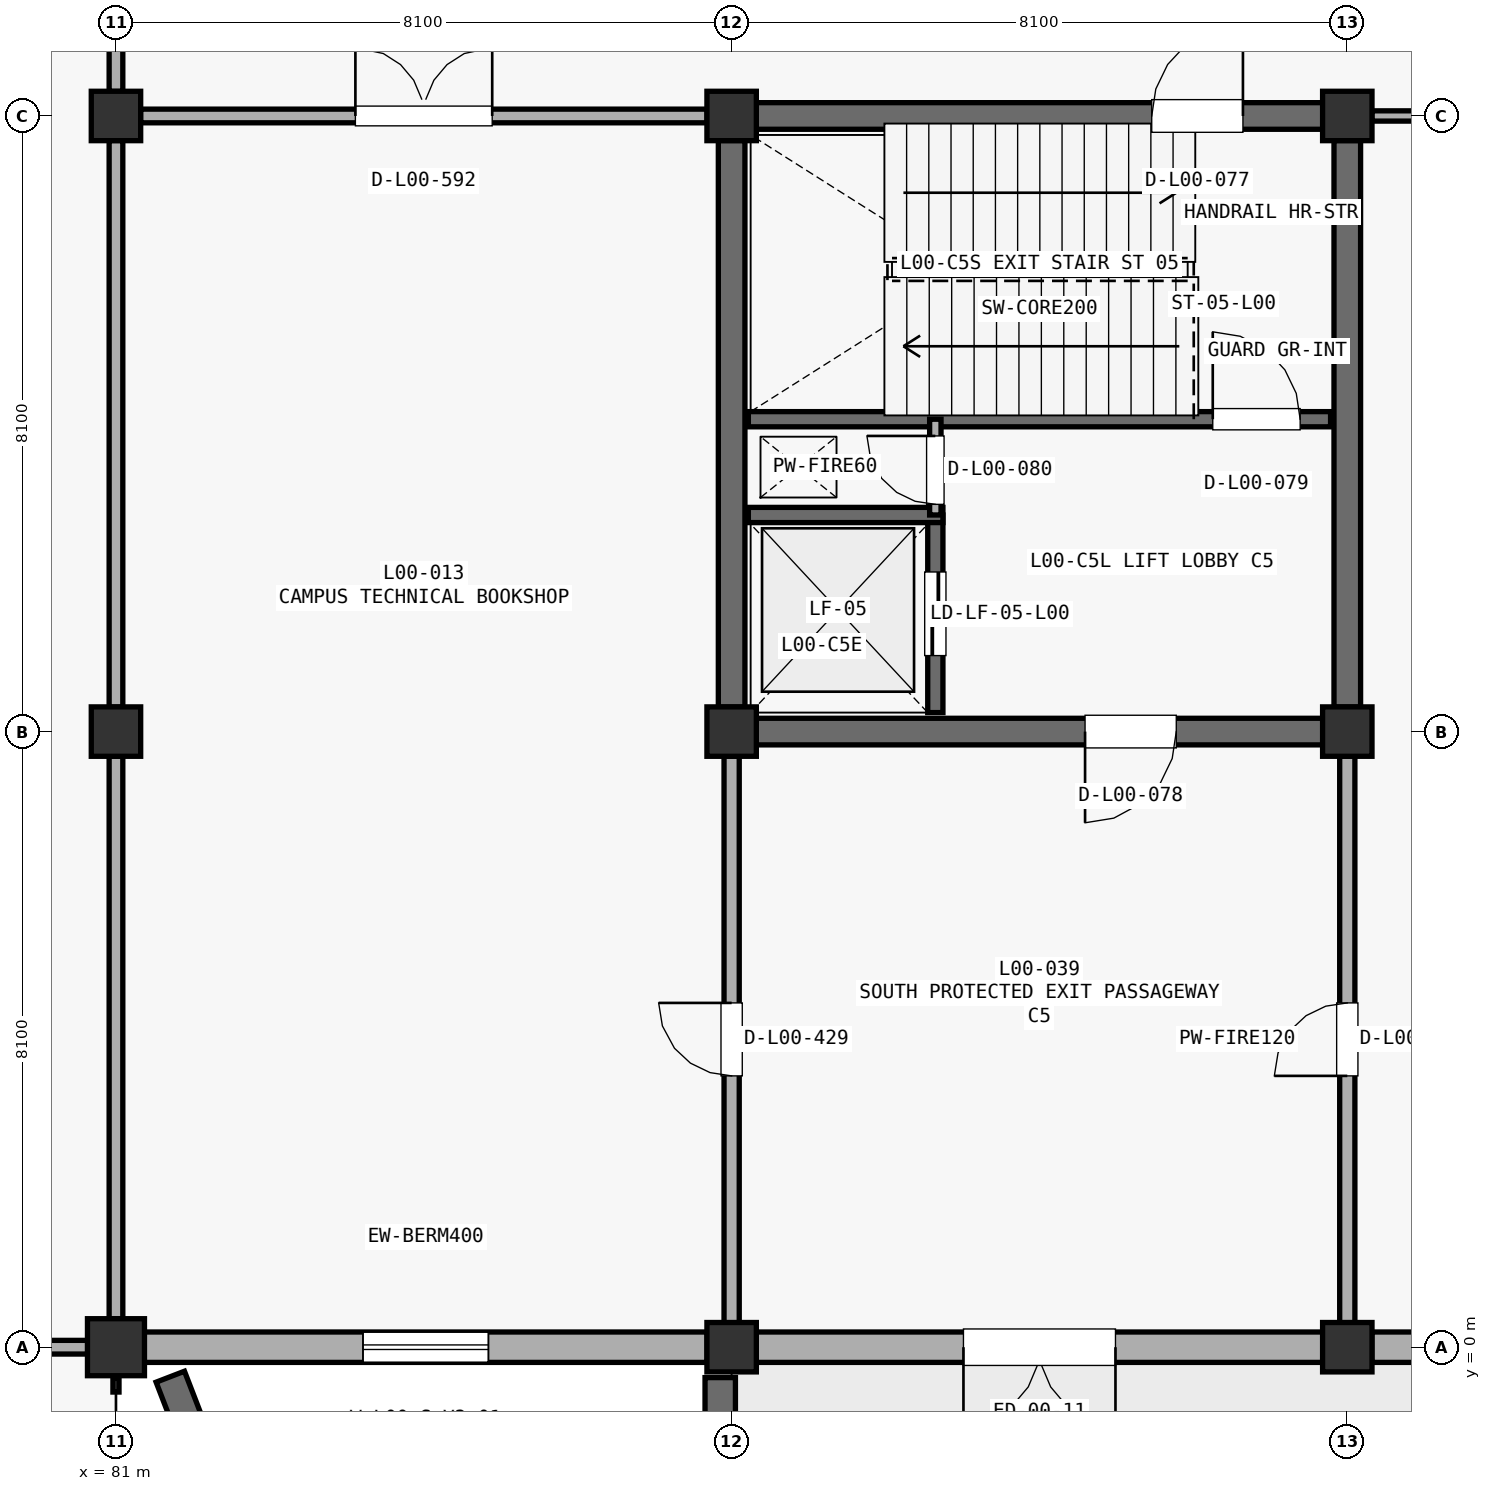
"""IFC4 building model, lengths in metres.
Left out: names, types, materials, properties, quantities, classifications, styles, units other than length and angle.
Written with IfcOpenShell. Run it as: python <this file> out.ifc"""

import sys

from ifc_helpers import new_model, si_unit, direction, frame, frame_2d, origin, origin_2d, place, context, subcontext, project, spatial, rectangle, circle, extrude, element, fill, save


model = new_model("IFC4")
c1 = context("Model", 3, precision=1e-05, world=origin(), true_north=direction((0.0, 1.0)))
c2 = subcontext(c1, "Body", "Model", "MODEL_VIEW")
j1 = project(units=[si_unit("LENGTHUNIT", "METRE"), si_unit("PLANEANGLEUNIT", "RADIAN")], contexts=[c1])
p1 = place(None, origin())
s1 = spatial("IfcSite", under=j1, at=p1, CompositionType="ELEMENT")
p2 = place(p1, origin())
s2 = spatial("IfcBuilding", under=s1, at=p2, CompositionType="ELEMENT")
p3 = place(p2, origin())
s3 = spatial("IfcBuildingStorey", under=s2, at=p3, CompositionType="ELEMENT", Elevation=0.0)
p4 = place(p3, frame((81.0, 0.0, 0.0), z_axis=(0.0, 0.0, 1.0), x_axis=(1.0, 0.0, 0.0)))
e1 = element("IfcColumn", 1, at=p4, inside=s3, PredefinedType="COLUMN", context=c2, shape_type="SweptSolid", body=[
    extrude(circle(Radius=0.375, at=origin_2d()), origin(), (0.0, 0.0, 1.0), 5.1),
])
for number, where, z_axis, x_axis in (
    (2, (81.0, 8.1, 0.0), (0.0, 0.0, 1.0), (1.0, 0.0, 0.0)),
    (3, (81.0, 16.2, 0.0), (0.0, 0.0, 1.0), (1.0, 0.0, 0.0)),
    (4, (89.1, 0.0, 0.0), (0.0, 0.0, 1.0), (1.0, 0.0, 0.0)),
    (5, (89.1, 8.1, 0.0), (0.0, 0.0, 1.0), (1.0, 0.0, 0.0)),
    (6, (89.1, 16.2, 0.0), (0.0, 0.0, 1.0), (1.0, 0.0, 0.0)),
    (7, (97.2, 0.0, 0.0), (0.0, 0.0, 1.0), (1.0, 0.0, 0.0)),
    (8, (97.2, 8.1, 0.0), (0.0, 0.0, 1.0), (1.0, 0.0, 0.0)),
    (9, (97.2, 16.2, 0.0), (0.0, 0.0, 1.0), (1.0, 0.0, 0.0)),
):
    element("IfcColumn", number, at=place(p3, frame(where, z_axis=z_axis, x_axis=x_axis)), inside=s3, PredefinedType="COLUMN", context=c2, shape_type="SweptSolid", body=[
        extrude(rectangle(XDim=0.65, YDim=0.65, at=origin_2d()), origin(), (0.0, 0.0, 1.0), 5.1),
    ])
p5 = place(p3, frame((88.95, -3.67, 0.0), z_axis=(0.0, 0.0, 1.0), x_axis=(0.0, 1.0, 0.0)))
e10 = element("IfcWall", 10, at=p5, inside=s3, PredefinedType="SOLIDWALL", context=c2, shape_type="SweptSolid", body=[
    extrude(rectangle(XDim=3.27, YDim=0.4, at=frame_2d((1.635, 0.0))), origin(), (0.0, 0.0, 1.0), 4.822),
])
p6 = place(p3, frame((81.715, -0.388, 0.0), z_axis=(0.0, 0.0, 1.0), x_axis=(0.359785215101, -0.933035154212, 0.0)))
e11 = element("IfcWall", 11, at=p6, inside=s3, PredefinedType="SOLIDWALL", context=c2, shape_type="SweptSolid", body=[
    extrude(rectangle(XDim=3.531, YDim=0.4, at=frame_2d((1.765, 0.0))), origin(), (0.0, 0.0, 1.0), 4.822),
])
p7 = place(p3, frame((81.373, 0.0, 0.0), z_axis=(0.0, 0.0, 1.0), x_axis=(1.0, 0.0, 0.0)))
e12 = element("IfcWall", 12, at=p7, inside=s3, PredefinedType="STANDARD", context=c2, shape_type="SweptSolid", body=[
    extrude(rectangle(XDim=7.404, YDim=0.4, at=frame_2d((3.702, 0.0))), origin(), (0.0, 0.0, 1.0), 4.289),
])
p8 = place(p7, frame((2.877, 0.0, 0.85)))
e13 = element("IfcOpeningElement", 13, at=p8, cuts=e12, PredefinedType="OPENING", context=c2, shape_type="SweptSolid", body=[
    extrude(rectangle(XDim=1.65, YDim=1.75, at=frame_2d((0.825, 0.875))), frame((0.0, 0.21, 0.0), z_axis=(0.0, -1.0, 0.0), x_axis=(1.0, 0.0, 0.0)), (0.0, 0.0, 1.0), 0.42),
])
p9 = place(p3, frame((89.423, 0.0, 0.0), z_axis=(0.0, 0.0, 1.0), x_axis=(1.0, 0.0, 0.0)))
e14 = element("IfcWall", 14, at=p9, inside=s3, PredefinedType="STANDARD", context=c2, shape_type="SweptSolid", body=[
    extrude(rectangle(XDim=7.454, YDim=0.4, at=frame_2d((3.727, 0.0))), origin(), (0.0, 0.0, 1.0), 4.359),
])
p10 = place(p9, frame((4.727, 0.0, 0.0), z_axis=(0.0, 0.0, 1.0), x_axis=(-1.0, 0.0, 0.0)))
e15 = element("IfcOpeningElement", 15, at=p10, cuts=e14, PredefinedType="OPENING", context=c2, shape_type="SweptSolid", body=[
    extrude(rectangle(XDim=2.0, YDim=2.2, at=frame_2d((1.0, 1.1))), frame((0.0, 0.21, 0.0), z_axis=(0.0, -1.0, 0.0), x_axis=(1.0, 0.0, 0.0)), (0.0, 0.0, 1.0), 0.42),
])
p11 = place(p3, frame((97.523, 0.0, 0.0), z_axis=(0.0, 0.0, 1.0), x_axis=(1.0, 0.0, 0.0)))
e16 = element("IfcWall", 16, at=p11, inside=s3, PredefinedType="STANDARD", context=c2, shape_type="SweptSolid", body=[
    extrude(rectangle(XDim=7.454, YDim=0.4, at=frame_2d((3.727, 0.0))), origin(), (0.0, 0.0, 1.0), 4.172),
])
p12 = place(p11, frame((4.927, 0.0, 0.0), z_axis=(0.0, 0.0, 1.0), x_axis=(-1.0, 0.0, 0.0)))
e17 = element("IfcOpeningElement", 17, at=p12, cuts=e16, PredefinedType="OPENING", context=c2, shape_type="SweptSolid", body=[
    extrude(rectangle(XDim=2.4, YDim=2.4, at=frame_2d((1.2, 1.2))), frame((0.0, 0.21, 0.0), z_axis=(0.0, -1.0, 0.0), x_axis=(1.0, 0.0, 0.0)), (0.0, 0.0, 1.0), 0.42),
])
p13 = place(p3, frame((89.423, 16.2, 0.0), z_axis=(0.0, 0.0, 1.0), x_axis=(1.0, 0.0, 0.0)))
e18 = element("IfcWall", 18, at=p13, inside=s3, PredefinedType="SHEAR", context=c2, shape_type="SweptSolid", body=[
    extrude(rectangle(XDim=7.454, YDim=0.35, at=frame_2d((3.727, 0.0))), origin(), (0.0, 0.0, 1.0), 4.822),
])
p14 = place(p13, frame((5.204, 0.0, 0.0)))
e19 = element("IfcOpeningElement", 19, at=p14, cuts=e18, PredefinedType="OPENING", context=c2, shape_type="SweptSolid", body=[
    extrude(rectangle(XDim=1.2, YDim=2.2, at=frame_2d((0.6, 1.1))), frame((0.0, 0.185, 0.0), z_axis=(0.0, -1.0, 0.0), x_axis=(1.0, 0.0, 0.0)), (0.0, 0.0, 1.0), 0.37),
])
for number, where, z_axis, x_axis in (
    (20, (89.1, 8.423, 0.0), (0.0, 0.0, 1.0), (0.0, 1.0, 0.0)),
    (21, (97.2, 8.423, 0.0), (0.0, 0.0, 1.0), (0.0, 1.0, 0.0)),
):
    element("IfcWall", number, at=place(p3, frame(where, z_axis=z_axis, x_axis=x_axis)), inside=s3, PredefinedType="SHEAR", context=c2, shape_type="SweptSolid", body=[
        extrude(rectangle(XDim=7.454, YDim=0.35, at=frame_2d((3.727, 0.0))), origin(), (0.0, 0.0, 1.0), 4.822),
    ])
p15 = place(p3, frame((89.423, 8.1, 0.0), z_axis=(0.0, 0.0, 1.0), x_axis=(1.0, 0.0, 0.0)))
e22 = element("IfcWall", 22, at=p15, inside=s3, PredefinedType="SHEAR", context=c2, shape_type="SweptSolid", body=[
    extrude(rectangle(XDim=7.454, YDim=0.35, at=frame_2d((3.727, 0.0))), origin(), (0.0, 0.0, 1.0), 4.822),
])
p16 = place(p15, frame((5.527, 0.0, 0.0), z_axis=(0.0, 0.0, 1.0), x_axis=(-1.0, 0.0, 0.0)))
e23 = element("IfcOpeningElement", 23, at=p16, cuts=e22, PredefinedType="OPENING", context=c2, shape_type="SweptSolid", body=[
    extrude(rectangle(XDim=1.2, YDim=2.2, at=frame_2d((0.6, 1.1))), frame((0.0, 0.185, 0.0), z_axis=(0.0, -1.0, 0.0), x_axis=(1.0, 0.0, 0.0)), (0.0, 0.0, 1.0), 0.37),
])
p17 = place(p3, frame((89.32, 12.21, 0.0), z_axis=(0.0, 0.0, 1.0), x_axis=(1.0, 0.0, 0.0)))
e24 = element("IfcWall", 24, at=p17, inside=s3, PredefinedType="SHEAR", context=c2, shape_type="SweptSolid", body=[
    extrude(rectangle(XDim=7.66, YDim=0.2, at=frame_2d((3.83, 0.0))), origin(), (0.0, 0.0, 1.0), 4.822),
])
p18 = place(p17, frame((6.11, 0.0, 0.0)))
e25 = element("IfcOpeningElement", 25, at=p18, cuts=e24, PredefinedType="OPENING", context=c2, shape_type="SweptSolid", body=[
    extrude(rectangle(XDim=1.15, YDim=2.2, at=frame_2d((0.575, 1.1))), frame((0.0, 0.11, 0.0), z_axis=(0.0, -1.0, 0.0), x_axis=(1.0, 0.0, 0.0)), (0.0, 0.0, 1.0), 0.22),
])
p19 = place(p3, frame((91.78, 8.35, 0.0), z_axis=(0.0, 0.0, 1.0), x_axis=(0.0, 1.0, 0.0)))
e26 = element("IfcWall", 26, at=p19, inside=s3, PredefinedType="SHEAR", context=c2, shape_type="SweptSolid", body=[
    extrude(rectangle(XDim=2.6, YDim=0.2, at=frame_2d((1.3, 0.0))), origin(), (0.0, 0.0, 1.0), 4.822),
])
p20 = place(p19, frame((0.75, 0.0, 0.0)))
e27 = element("IfcOpeningElement", 27, at=p20, cuts=e26, PredefinedType="OPENING", context=c2, shape_type="SweptSolid", body=[
    extrude(rectangle(XDim=1.1, YDim=2.2, at=frame_2d((0.55, 1.1))), frame((0.0, 0.11, 0.0), z_axis=(0.0, -1.0, 0.0), x_axis=(1.0, 0.0, 0.0)), (0.0, 0.0, 1.0), 0.22),
])
p21 = place(p3, frame((89.32, 10.95, 0.0), z_axis=(0.0, 0.0, 1.0), x_axis=(1.0, 0.0, 0.0)))
e28 = element("IfcWall", 28, at=p21, inside=s3, PredefinedType="SHEAR", context=c2, shape_type="SweptSolid", body=[
    extrude(rectangle(XDim=2.56, YDim=0.2, at=frame_2d((1.28, 0.0))), origin(), (0.0, 0.0, 1.0), 4.822),
])
p22 = place(p3, frame((91.78, 10.95, 0.0), z_axis=(0.0, 0.0, 1.0), x_axis=(0.0, 1.0, 0.0)))
e29 = element("IfcWall", 29, at=p22, inside=s3, PredefinedType="PARTITIONING", context=c2, shape_type="SweptSolid", body=[
    extrude(rectangle(XDim=1.26, YDim=0.15, at=frame_2d((0.63, 0.0))), origin(), (0.0, 0.0, 1.0), 4.822),
])
p23 = place(p22, frame((0.14, 0.0, 0.0)))
e30 = element("IfcOpeningElement", 30, at=p23, cuts=e29, PredefinedType="OPENING", context=c2, shape_type="SweptSolid", body=[
    extrude(rectangle(XDim=0.9, YDim=2.15, at=frame_2d((0.45, 1.075))), frame((0.0, 0.085, 0.0), z_axis=(0.0, -1.0, 0.0), x_axis=(1.0, 0.0, 0.0)), (0.0, 0.0, 1.0), 0.17),
])
p24 = place(p3, frame((81.0, 0.373, 0.0), z_axis=(0.0, 0.0, 1.0), x_axis=(0.0, 1.0, 0.0)))
e31 = element("IfcWall", 31, at=p24, inside=s3, PredefinedType="PARTITIONING", context=c2, shape_type="SweptSolid", body=[
    extrude(rectangle(XDim=7.404, YDim=0.18, at=frame_2d((3.702, 0.0))), origin(), (0.0, 0.0, 1.0), 4.289),
])
p25 = place(p3, frame((81.0, 8.423, 0.0), z_axis=(0.0, 0.0, 1.0), x_axis=(0.0, 1.0, 0.0)))
e32 = element("IfcWall", 32, at=p25, inside=s3, PredefinedType="PARTITIONING", context=c2, shape_type="SweptSolid", body=[
    extrude(rectangle(XDim=7.454, YDim=0.18, at=frame_2d((3.727, 0.0))), origin(), (0.0, 0.0, 1.0), 4.359),
])
p26 = place(p3, frame((81.0, 16.523, 0.0), z_axis=(0.0, 0.0, 1.0), x_axis=(0.0, 1.0, 0.0)))
e33 = element("IfcWall", 33, at=p26, inside=s3, PredefinedType="PARTITIONING", context=c2, shape_type="SweptSolid", body=[
    extrude(rectangle(XDim=7.454, YDim=0.18, at=frame_2d((3.727, 0.0))), origin(), (0.0, 0.0, 1.0), 4.172),
])
p27 = place(p3, frame((73.223, 0.0, 0.0), z_axis=(0.0, 0.0, 1.0), x_axis=(1.0, 0.0, 0.0)))
e34 = element("IfcWall", 34, at=p27, inside=s3, PredefinedType="PARTITIONING", context=c2, shape_type="SweptSolid", body=[
    extrude(rectangle(XDim=7.404, YDim=0.18, at=frame_2d((3.702, 0.0))), origin(), (0.0, 0.0, 1.0), 4.407),
])
p28 = place(p3, frame((81.323, 16.2, 0.0), z_axis=(0.0, 0.0, 1.0), x_axis=(1.0, 0.0, 0.0)))
e35 = element("IfcWall", 35, at=p28, inside=s3, PredefinedType="PARTITIONING", context=c2, shape_type="SweptSolid", body=[
    extrude(rectangle(XDim=7.454, YDim=0.18, at=frame_2d((3.727, 0.0))), origin(), (0.0, 0.0, 1.0), 4.362),
])
p29 = place(p28, frame((2.827, 0.0, 0.0)))
e36 = element("IfcOpeningElement", 36, at=p29, cuts=e35, PredefinedType="OPENING", context=c2, shape_type="SweptSolid", body=[
    extrude(rectangle(XDim=1.8, YDim=2.2, at=frame_2d((0.9, 1.1))), frame((0.0, 0.1, 0.0), z_axis=(0.0, -1.0, 0.0), x_axis=(1.0, 0.0, 0.0)), (0.0, 0.0, 1.0), 0.2),
])
p30 = place(p3, frame((97.523, 16.2, 0.0), z_axis=(0.0, 0.0, 1.0), x_axis=(1.0, 0.0, 0.0)))
e37 = element("IfcWall", 37, at=p30, inside=s3, PredefinedType="PARTITIONING", context=c2, shape_type="SweptSolid", body=[
    extrude(rectangle(XDim=7.404, YDim=0.135, at=frame_2d((3.702, 0.0))), origin(), (0.0, 0.0, 1.0), 4.464),
])
p31 = place(p3, frame((97.2, 0.323, 0.0), z_axis=(0.0, 0.0, 1.0), x_axis=(0.0, 1.0, 0.0)))
e38 = element("IfcWall", 38, at=p31, inside=s3, PredefinedType="PARTITIONING", context=c2, shape_type="SweptSolid", body=[
    extrude(rectangle(XDim=7.454, YDim=0.2, at=frame_2d((3.727, 0.0))), origin(), (0.0, 0.0, 1.0), 4.362),
])
p32 = place(p31, frame((3.247, 0.0, 0.0)))
e39 = element("IfcOpeningElement", 39, at=p32, cuts=e38, PredefinedType="OPENING", context=c2, shape_type="SweptSolid", body=[
    extrude(rectangle(XDim=0.96, YDim=2.15, at=frame_2d((0.48, 1.075))), frame((0.0, 0.11, 0.0), z_axis=(0.0, -1.0, 0.0), x_axis=(1.0, 0.0, 0.0)), (0.0, 0.0, 1.0), 0.22),
])
p33 = place(p3, frame((89.1, 0.323, 0.0), z_axis=(0.0, 0.0, 1.0), x_axis=(0.0, 1.0, 0.0)))
e40 = element("IfcWall", 40, at=p33, inside=s3, PredefinedType="PARTITIONING", context=c2, shape_type="SweptSolid", body=[
    extrude(rectangle(XDim=7.454, YDim=0.2, at=frame_2d((3.727, 0.0))), origin(), (0.0, 0.0, 1.0), 4.359),
])
p34 = place(p33, frame((3.247, 0.0, 0.0)))
e41 = element("IfcOpeningElement", 41, at=p34, cuts=e40, PredefinedType="OPENING", context=c2, shape_type="SweptSolid", body=[
    extrude(rectangle(XDim=0.96, YDim=2.15, at=frame_2d((0.48, 1.075))), frame((0.0, 0.11, 0.0), z_axis=(0.0, -1.0, 0.0), x_axis=(1.0, 0.0, 0.0)), (0.0, 0.0, 1.0), 0.22),
])
p35 = place(p8, origin())
e42 = element("IfcWindow", 42, at=p35, inside=s3, PartitioningType="SINGLE_PANEL", PredefinedType="WINDOW", context=c2, shape_type="SweptSolid", body=[
    extrude(rectangle(XDim=1.65, YDim=1.75, at=frame_2d((0.825, 0.875))), frame((0.0, 0.03, 0.0), z_axis=(0.0, -1.0, 0.0), x_axis=(1.0, 0.0, 0.0)), (0.0, 0.0, 1.0), 0.06),
])
fill(e13, e42)
p36 = place(p10, origin())
e43 = element("IfcDoor", 43, at=p36, inside=s3, OperationType="DOUBLE_SWING_LEFT", PredefinedType="DOOR", context=c2, shape_type="SweptSolid", body=[
    extrude(rectangle(XDim=2.0, YDim=2.2, at=frame_2d((1.0, 1.1))), frame((0.0, 0.025, 0.0), z_axis=(0.0, -1.0, 0.0), x_axis=(1.0, 0.0, 0.0)), (0.0, 0.0, 1.0), 0.05),
])
fill(e15, e43)
p37 = place(p14, origin())
e44 = element("IfcDoor", 44, at=p37, inside=s3, OperationType="SINGLE_SWING_RIGHT", PredefinedType="DOOR", context=c2, shape_type="SweptSolid", body=[
    extrude(rectangle(XDim=1.2, YDim=2.2, at=frame_2d((0.6, 1.1))), frame((0.0, 0.025, 0.0), z_axis=(0.0, -1.0, 0.0), x_axis=(1.0, 0.0, 0.0)), (0.0, 0.0, 1.0), 0.05),
])
fill(e19, e44)
p38 = place(p16, origin())
e45 = element("IfcDoor", 45, at=p38, inside=s3, OperationType="SINGLE_SWING_LEFT", PredefinedType="DOOR", context=c2, shape_type="SweptSolid", body=[
    extrude(rectangle(XDim=1.2, YDim=2.2, at=frame_2d((0.6, 1.1))), frame((0.0, 0.025, 0.0), z_axis=(0.0, -1.0, 0.0), x_axis=(1.0, 0.0, 0.0)), (0.0, 0.0, 1.0), 0.05),
])
fill(e23, e45)
p39 = place(p18, origin())
e46 = element("IfcDoor", 46, at=p39, inside=s3, OperationType="SINGLE_SWING_LEFT", PredefinedType="DOOR", context=c2, shape_type="SweptSolid", body=[
    extrude(rectangle(XDim=1.15, YDim=2.2, at=frame_2d((0.575, 1.1))), frame((0.0, 0.025, 0.0), z_axis=(0.0, -1.0, 0.0), x_axis=(1.0, 0.0, 0.0)), (0.0, 0.0, 1.0), 0.05),
])
fill(e25, e46)
p40 = place(p20, origin())
e47 = element("IfcDoor", 47, at=p40, inside=s3, OperationType="SLIDING_TO_LEFT", PredefinedType="DOOR", context=c2, shape_type="SweptSolid", body=[
    extrude(rectangle(XDim=1.1, YDim=2.2, at=frame_2d((0.55, 1.1))), frame((0.0, 0.025, 0.0), z_axis=(0.0, -1.0, 0.0), x_axis=(1.0, 0.0, 0.0)), (0.0, 0.0, 1.0), 0.05),
])
fill(e27, e47)
p41 = place(p23, origin())
e48 = element("IfcDoor", 48, at=p41, inside=s3, OperationType="SINGLE_SWING_RIGHT", PredefinedType="DOOR", context=c2, shape_type="SweptSolid", body=[
    extrude(rectangle(XDim=0.9, YDim=2.15, at=frame_2d((0.45, 1.075))), frame((0.0, 0.025, 0.0), z_axis=(0.0, -1.0, 0.0), x_axis=(1.0, 0.0, 0.0)), (0.0, 0.0, 1.0), 0.05),
])
fill(e30, e48)
p42 = place(p32, origin())
e49 = element("IfcDoor", 49, at=p42, inside=s3, OperationType="SINGLE_SWING_LEFT", PredefinedType="DOOR", context=c2, shape_type="SweptSolid", body=[
    extrude(rectangle(XDim=0.96, YDim=2.15, at=frame_2d((0.48, 1.075))), frame((0.0, 0.025, 0.0), z_axis=(0.0, -1.0, 0.0), x_axis=(1.0, 0.0, 0.0)), (0.0, 0.0, 1.0), 0.05),
])
fill(e39, e49)
p43 = place(p34, origin())
e50 = element("IfcDoor", 50, at=p43, inside=s3, OperationType="SINGLE_SWING_RIGHT", PredefinedType="DOOR", context=c2, shape_type="SweptSolid", body=[
    extrude(rectangle(XDim=0.96, YDim=2.15, at=frame_2d((0.48, 1.075))), frame((0.0, 0.025, 0.0), z_axis=(0.0, -1.0, 0.0), x_axis=(1.0, 0.0, 0.0)), (0.0, 0.0, 1.0), 0.05),
])
fill(e41, e50)
p44 = place(p29, origin())
e51 = element("IfcDoor", 51, at=p44, inside=s3, OperationType="DOUBLE_SWING_LEFT", PredefinedType="DOOR", context=c2, shape_type="SweptSolid", body=[
    extrude(rectangle(XDim=1.8, YDim=2.2, at=frame_2d((0.9, 1.1))), frame((0.0, 0.025, 0.0), z_axis=(0.0, -1.0, 0.0), x_axis=(1.0, 0.0, 0.0)), (0.0, 0.0, 1.0), 0.05),
])
fill(e36, e51)
save(model, sys.argv[1])
